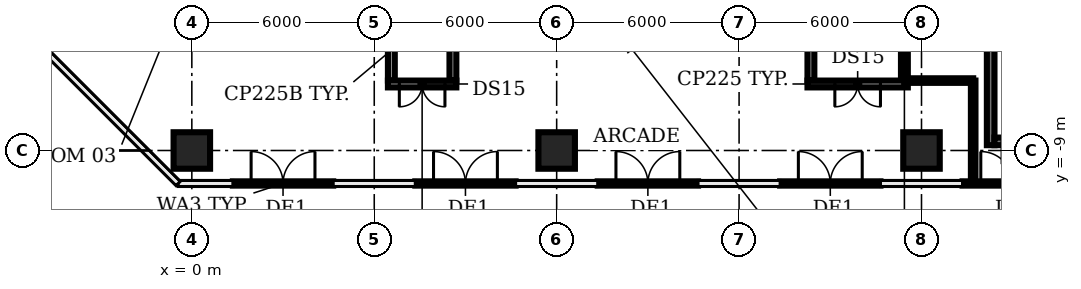
"""IFC4 building model, lengths in metres.
Left out: names, types, materials, properties, quantities, classifications, styles, units other than length and angle.
Written with IfcOpenShell. Run it as: python <this file> out.ifc"""

import sys

from ifc_helpers import new_model, si_unit, direction, frame, frame_2d, origin, origin_2d, place, context, subcontext, project, spatial, rectangle, extrude, element, fill, save


model = new_model("IFC4")
c1 = context("Model", 3, precision=1e-05, world=origin(), true_north=direction((0.0, 1.0)))
c2 = subcontext(c1, "Body", "Model", "MODEL_VIEW")
j1 = project(units=[si_unit("LENGTHUNIT", "METRE"), si_unit("PLANEANGLEUNIT", "RADIAN")], contexts=[c1])
p1 = place(None, origin())
s1 = spatial("IfcSite", under=j1, at=p1, CompositionType="ELEMENT")
p2 = place(p1, origin())
s2 = spatial("IfcBuilding", under=s1, at=p2, CompositionType="ELEMENT")
p3 = place(p2, origin())
s3 = spatial("IfcBuildingStorey", under=s2, at=p3, CompositionType="ELEMENT", Elevation=0.0)
for number, where, z_axis, x_axis in (
    (1, (0.0, -9.0, 0.0), (0.0, 0.0, 1.0), (1.0, 0.0, 0.0)),
    (2, (12.0, -9.0, 0.0), (0.0, 0.0, 1.0), (1.0, 0.0, 0.0)),
    (3, (24.0, -9.0, 0.0), (0.0, 0.0, 1.0), (1.0, 0.0, 0.0)),
):
    element("IfcColumn", number, at=place(p3, frame(where, z_axis=z_axis, x_axis=x_axis)), inside=s3, PredefinedType="COLUMN", context=c2, shape_type="SweptSolid", body=[
        extrude(rectangle(XDim=1.2, YDim=1.2, at=origin_2d()), origin(), (0.0, 0.0, 1.0), 5.65),
    ])
p4 = place(p3, frame((1.35, -10.085, 0.0), z_axis=(0.0, 0.0, 1.0), x_axis=(1.0, 0.0, 0.0)))
e4 = element("IfcWall", 4, at=p4, inside=s3, PredefinedType="SOLIDWALL", context=c2, shape_type="SweptSolid", body=[
    extrude(rectangle(XDim=3.3, YDim=0.14, at=frame_2d((1.65, 0.0))), origin(), (0.0, 0.0, 1.0), 5.65),
])
p5 = place(p4, frame((0.6, 0.0, 0.0)))
e5 = element("IfcOpeningElement", 5, at=p5, cuts=e4, PredefinedType="OPENING", context=c2, shape_type="SweptSolid", body=[
    extrude(rectangle(XDim=2.1, YDim=2.4, at=frame_2d((1.05, 1.2))), frame((0.0, 0.08, 0.0), z_axis=(0.0, -1.0, 0.0), x_axis=(1.0, 0.0, 0.0)), (0.0, 0.0, 1.0), 0.16),
])
p6 = place(p3, frame((7.35, -10.085, 0.0), z_axis=(0.0, 0.0, 1.0), x_axis=(1.0, 0.0, 0.0)))
e6 = element("IfcWall", 6, at=p6, inside=s3, PredefinedType="SOLIDWALL", context=c2, shape_type="SweptSolid", body=[
    extrude(rectangle(XDim=3.3, YDim=0.14, at=frame_2d((1.65, 0.0))), origin(), (0.0, 0.0, 1.0), 5.65),
])
p7 = place(p6, frame((0.6, 0.0, 0.0)))
e7 = element("IfcOpeningElement", 7, at=p7, cuts=e6, PredefinedType="OPENING", context=c2, shape_type="SweptSolid", body=[
    extrude(rectangle(XDim=2.1, YDim=2.4, at=frame_2d((1.05, 1.2))), frame((0.0, 0.08, 0.0), z_axis=(0.0, -1.0, 0.0), x_axis=(1.0, 0.0, 0.0)), (0.0, 0.0, 1.0), 0.16),
])
p8 = place(p3, frame((13.35, -10.085, 0.0), z_axis=(0.0, 0.0, 1.0), x_axis=(1.0, 0.0, 0.0)))
e8 = element("IfcWall", 8, at=p8, inside=s3, PredefinedType="SOLIDWALL", context=c2, shape_type="SweptSolid", body=[
    extrude(rectangle(XDim=3.3, YDim=0.14, at=frame_2d((1.65, 0.0))), origin(), (0.0, 0.0, 1.0), 5.65),
])
p9 = place(p8, frame((0.6, 0.0, 0.0)))
e9 = element("IfcOpeningElement", 9, at=p9, cuts=e8, PredefinedType="OPENING", context=c2, shape_type="SweptSolid", body=[
    extrude(rectangle(XDim=2.1, YDim=2.4, at=frame_2d((1.05, 1.2))), frame((0.0, 0.08, 0.0), z_axis=(0.0, -1.0, 0.0), x_axis=(1.0, 0.0, 0.0)), (0.0, 0.0, 1.0), 0.16),
])
p10 = place(p3, frame((19.35, -10.085, 0.0), z_axis=(0.0, 0.0, 1.0), x_axis=(1.0, 0.0, 0.0)))
e10 = element("IfcWall", 10, at=p10, inside=s3, PredefinedType="SOLIDWALL", context=c2, shape_type="SweptSolid", body=[
    extrude(rectangle(XDim=3.3, YDim=0.14, at=frame_2d((1.65, 0.0))), origin(), (0.0, 0.0, 1.0), 5.65),
])
p11 = place(p10, frame((0.6, 0.0, 0.0)))
e11 = element("IfcOpeningElement", 11, at=p11, cuts=e10, PredefinedType="OPENING", context=c2, shape_type="SweptSolid", body=[
    extrude(rectangle(XDim=2.1, YDim=2.4, at=frame_2d((1.05, 1.2))), frame((0.0, 0.08, 0.0), z_axis=(0.0, -1.0, 0.0), x_axis=(1.0, 0.0, 0.0)), (0.0, 0.0, 1.0), 0.16),
])
p12 = place(p3, frame((25.35, -10.085, 0.0), z_axis=(0.0, 0.0, 1.0), x_axis=(1.0, 0.0, 0.0)))
e12 = element("IfcWall", 12, at=p12, inside=s3, PredefinedType="SOLIDWALL", context=c2, shape_type="SweptSolid", body=[
    extrude(rectangle(XDim=3.3, YDim=0.14, at=frame_2d((1.65, 0.0))), origin(), (0.0, 0.0, 1.0), 5.65),
])
p13 = place(p12, frame((0.6, 0.0, 0.0)))
e13 = element("IfcOpeningElement", 13, at=p13, cuts=e12, PredefinedType="OPENING", context=c2, shape_type="SweptSolid", body=[
    extrude(rectangle(XDim=2.1, YDim=2.4, at=frame_2d((1.05, 1.2))), frame((0.0, 0.08, 0.0), z_axis=(0.0, -1.0, 0.0), x_axis=(1.0, 0.0, 0.0)), (0.0, 0.0, 1.0), 0.16),
])
p14 = place(p3, frame((26.275, -8.825, 0.0), z_axis=(0.0, 0.0, 1.0), x_axis=(0.0, 1.0, 0.0)))
e14 = element("IfcWall", 14, at=p14, inside=s3, PredefinedType="SHEAR", context=c2, shape_type="SweptSolid", body=[
    extrude(rectangle(XDim=4.65, YDim=0.25, at=frame_2d((2.325, 0.0))), origin(), (0.0, 0.0, 1.0), 5.65),
])
p15 = place(p3, frame((34.6, -8.7, 0.0), z_axis=(0.0, 0.0, 1.0), x_axis=(-1.0, 0.0, 0.0)))
e15 = element("IfcWall", 15, at=p15, inside=s3, PredefinedType="SHEAR", context=c2, shape_type="SweptSolid", body=[
    extrude(rectangle(XDim=8.2, YDim=0.25, at=frame_2d((4.1, 0.0))), origin(), (0.0, 0.0, 1.0), 5.65),
])
p16 = place(p15, frame((6.45, 0.0, 0.0)))
e16 = element("IfcOpeningElement", 16, at=p16, cuts=e15, PredefinedType="OPENING", context=c2, shape_type="SweptSolid", body=[
    extrude(rectangle(XDim=1.5, YDim=2.1, at=frame_2d((0.75, 1.05))), frame((0.0, 0.135, 0.0), z_axis=(0.0, -1.0, 0.0), x_axis=(1.0, 0.0, 0.0)), (0.0, 0.0, 1.0), 0.27),
])
for number, where, z_axis, x_axis in (
    (17, (6.562, -6.7, 0.0), (0.0, 0.0, 1.0), (0.0, 1.0, 0.0)),
    (18, (8.587, -4.35, 0.0), (0.0, 0.0, 1.0), (0.0, -1.0, 0.0)),
):
    element("IfcWall", number, at=place(p3, frame(where, z_axis=z_axis, x_axis=x_axis)), inside=s3, PredefinedType="PARTITIONING", context=c2, shape_type="SweptSolid", body=[
        extrude(rectangle(XDim=2.35, YDim=0.225, at=frame_2d((1.175, 0.0))), origin(), (0.0, 0.0, 1.0), 5.65),
    ])
p17 = place(p3, frame((8.7, -6.812, 0.0), z_axis=(0.0, 0.0, 1.0), x_axis=(-1.0, 0.0, 0.0)))
e19 = element("IfcWall", 19, at=p17, inside=s3, PredefinedType="PARTITIONING", context=c2, shape_type="SweptSolid", body=[
    extrude(rectangle(XDim=2.25, YDim=0.225, at=frame_2d((1.125, 0.0))), origin(), (0.0, 0.0, 1.0), 5.65),
])
p18 = place(p17, frame((0.375, 0.0, 0.0)))
e20 = element("IfcOpeningElement", 20, at=p18, cuts=e19, PredefinedType="OPENING", context=c2, shape_type="SweptSolid", body=[
    extrude(rectangle(XDim=1.5, YDim=2.1, at=frame_2d((0.75, 1.05))), frame((0.0, 0.123, 0.0), z_axis=(0.0, -1.0, 0.0), x_axis=(1.0, 0.0, 0.0)), (0.0, 0.0, 1.0), 0.245),
])
for number, where, z_axis, x_axis in (
    (21, (20.363, -6.7, 0.0), (0.0, 0.0, 1.0), (0.0, 1.0, 0.0)),
    (22, (23.438, -4.35, 0.0), (0.0, 0.0, 1.0), (0.0, -1.0, 0.0)),
):
    element("IfcWall", number, at=place(p3, frame(where, z_axis=z_axis, x_axis=x_axis)), inside=s3, PredefinedType="PARTITIONING", context=c2, shape_type="SweptSolid", body=[
        extrude(rectangle(XDim=2.35, YDim=0.225, at=frame_2d((1.175, 0.0))), origin(), (0.0, 0.0, 1.0), 5.65),
    ])
p19 = place(p3, frame((23.55, -6.812, 0.0), z_axis=(0.0, 0.0, 1.0), x_axis=(-1.0, 0.0, 0.0)))
e23 = element("IfcWall", 23, at=p19, inside=s3, PredefinedType="PARTITIONING", context=c2, shape_type="SweptSolid", body=[
    extrude(rectangle(XDim=3.3, YDim=0.225, at=frame_2d((1.65, 0.0))), origin(), (0.0, 0.0, 1.0), 5.65),
])
p20 = place(p19, frame((0.9, 0.0, 0.0)))
e24 = element("IfcOpeningElement", 24, at=p20, cuts=e23, PredefinedType="OPENING", context=c2, shape_type="SweptSolid", body=[
    extrude(rectangle(XDim=1.5, YDim=2.1, at=frame_2d((0.75, 1.05))), frame((0.0, 0.123, 0.0), z_axis=(0.0, -1.0, 0.0), x_axis=(1.0, 0.0, 0.0)), (0.0, 0.0, 1.0), 0.245),
])
p21 = place(p3, frame((23.43, -6.7, 0.0), z_axis=(0.0, 0.0, 1.0), x_axis=(1.0, 0.0, 0.0)))
e25 = element("IfcWall", 25, at=p21, inside=s3, PredefinedType="PARTITIONING", context=c2, shape_type="SweptSolid", body=[
    extrude(rectangle(XDim=2.27, YDim=0.15, at=frame_2d((1.135, 0.0))), origin(), (0.0, 0.0, 1.0), 4.53),
])
p22 = place(p3, frame((25.7, -10.03, 0.0), z_axis=(0.0, 0.0, 1.0), x_axis=(0.0, 1.0, 0.0)))
e26 = element("IfcWall", 26, at=p22, inside=s3, PredefinedType="PARTITIONING", context=c2, shape_type="SweptSolid", body=[
    extrude(rectangle(XDim=3.33, YDim=0.15, at=frame_2d((1.665, 0.0))), origin(), (0.0, 0.0, 1.0), 4.53),
])
p23 = place(p5, origin())
e27 = element("IfcDoor", 27, at=p23, inside=s3, OperationType="DOUBLE_DOOR_DOUBLE_SWING", PredefinedType="DOOR", context=c2, shape_type="SweptSolid", body=[
    extrude(rectangle(XDim=2.1, YDim=2.4, at=frame_2d((1.05, 1.2))), frame((0.0, 0.025, 0.0), z_axis=(0.0, -1.0, 0.0), x_axis=(1.0, 0.0, 0.0)), (0.0, 0.0, 1.0), 0.05),
])
fill(e5, e27)
p24 = place(p7, origin())
e28 = element("IfcDoor", 28, at=p24, inside=s3, OperationType="DOUBLE_DOOR_DOUBLE_SWING", PredefinedType="DOOR", context=c2, shape_type="SweptSolid", body=[
    extrude(rectangle(XDim=2.1, YDim=2.4, at=frame_2d((1.05, 1.2))), frame((0.0, 0.025, 0.0), z_axis=(0.0, -1.0, 0.0), x_axis=(1.0, 0.0, 0.0)), (0.0, 0.0, 1.0), 0.05),
])
fill(e7, e28)
p25 = place(p9, origin())
e29 = element("IfcDoor", 29, at=p25, inside=s3, OperationType="DOUBLE_DOOR_DOUBLE_SWING", PredefinedType="DOOR", context=c2, shape_type="SweptSolid", body=[
    extrude(rectangle(XDim=2.1, YDim=2.4, at=frame_2d((1.05, 1.2))), frame((0.0, 0.025, 0.0), z_axis=(0.0, -1.0, 0.0), x_axis=(1.0, 0.0, 0.0)), (0.0, 0.0, 1.0), 0.05),
])
fill(e9, e29)
p26 = place(p11, origin())
e30 = element("IfcDoor", 30, at=p26, inside=s3, OperationType="DOUBLE_DOOR_DOUBLE_SWING", PredefinedType="DOOR", context=c2, shape_type="SweptSolid", body=[
    extrude(rectangle(XDim=2.1, YDim=2.4, at=frame_2d((1.05, 1.2))), frame((0.0, 0.025, 0.0), z_axis=(0.0, -1.0, 0.0), x_axis=(1.0, 0.0, 0.0)), (0.0, 0.0, 1.0), 0.05),
])
fill(e11, e30)
p27 = place(p13, origin())
e31 = element("IfcDoor", 31, at=p27, inside=s3, OperationType="DOUBLE_DOOR_DOUBLE_SWING", PredefinedType="DOOR", context=c2, shape_type="SweptSolid", body=[
    extrude(rectangle(XDim=2.1, YDim=2.4, at=frame_2d((1.05, 1.2))), frame((0.0, 0.025, 0.0), z_axis=(0.0, -1.0, 0.0), x_axis=(1.0, 0.0, 0.0)), (0.0, 0.0, 1.0), 0.05),
])
fill(e13, e31)
p28 = place(p18, origin())
e32 = element("IfcDoor", 32, at=p28, inside=s3, OperationType="DOUBLE_DOOR_SINGLE_SWING", PredefinedType="DOOR", context=c2, shape_type="SweptSolid", body=[
    extrude(rectangle(XDim=1.5, YDim=2.1, at=frame_2d((0.75, 1.05))), frame((0.0, 0.025, 0.0), z_axis=(0.0, -1.0, 0.0), x_axis=(1.0, 0.0, 0.0)), (0.0, 0.0, 1.0), 0.05),
])
fill(e20, e32)
p29 = place(p20, origin())
e33 = element("IfcDoor", 33, at=p29, inside=s3, OperationType="DOUBLE_DOOR_SINGLE_SWING", PredefinedType="DOOR", context=c2, shape_type="SweptSolid", body=[
    extrude(rectangle(XDim=1.5, YDim=2.1, at=frame_2d((0.75, 1.05))), frame((0.0, 0.025, 0.0), z_axis=(0.0, -1.0, 0.0), x_axis=(1.0, 0.0, 0.0)), (0.0, 0.0, 1.0), 0.05),
])
fill(e24, e33)
save(model, sys.argv[1])
